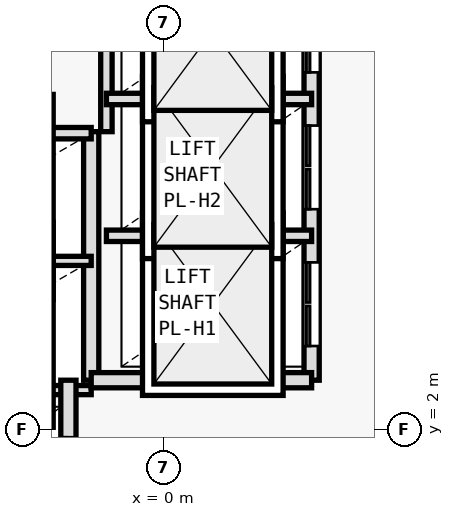
"""IFC4 building model, lengths in metres.
Left out: names, types, materials, properties, quantities, classifications, styles, units other than length and angle.
Written with IfcOpenShell. Run it as: python <this file> out.ifc"""

import sys

from ifc_helpers import new_model, si_unit, direction, frame, frame_2d, origin, place, context, subcontext, project, spatial, rectangle, extrude, element, fill, save


model = new_model("IFC4")
c1 = context("Model", 3, precision=1e-05, world=origin(), true_north=direction((0.0, 1.0)))
c2 = subcontext(c1, "Body", "Model", "MODEL_VIEW")
j1 = project(units=[si_unit("LENGTHUNIT", "METRE"), si_unit("PLANEANGLEUNIT", "RADIAN")], contexts=[c1])
p1 = place(None, origin())
s1 = spatial("IfcSite", under=j1, at=p1, CompositionType="ELEMENT")
p2 = place(p1, origin())
s2 = spatial("IfcBuilding", under=s1, at=p2, CompositionType="ELEMENT")
p3 = place(p2, frame((0.0, 0.0, 205.5)))
s3 = spatial("IfcBuildingStorey", under=s2, at=p3, CompositionType="ELEMENT", Elevation=205.5)
p4 = place(p3, frame((-0.95, 2.65, 0.0), z_axis=(0.0, 0.0, 1.0), x_axis=(0.0, 1.0, 0.0)))
e1 = element("IfcWall", 1, at=p4, inside=s3, PredefinedType="SOLIDWALL", context=c2, shape_type="SweptSolid", body=[
    extrude(rectangle(XDim=3.27, YDim=0.2, at=frame_2d((1.635, 0.0))), origin(), (0.0, 0.0, 1.0), 3.35),
])
for number, where, z_axis, x_axis in (
    (2, (-3.85, 2.52, 0.0), (0.0, 0.0, 1.0), (1.0, 0.0, 0.0)),
    (3, (-3.85, 4.22, 0.0), (0.0, 0.0, 1.0), (1.0, 0.0, 0.0)),
):
    element("IfcWall", number, at=place(p3, frame(where, z_axis=z_axis, x_axis=x_axis)), inside=s3, PredefinedType="PARTITIONING", context=c2, shape_type="SweptSolid", body=[
        extrude(rectangle(XDim=2.9, YDim=0.12, at=frame_2d((1.45, 0.0))), origin(), (0.0, 0.0, 1.0), 3.35),
    ])
p5 = place(p3, frame((-3.85, 5.9, 0.0), z_axis=(0.0, 0.0, 1.0), x_axis=(1.0, 0.0, 0.0)))
e4 = element("IfcWall", 4, at=p5, inside=s3, PredefinedType="PARTITIONING", context=c2, shape_type="SweptSolid", body=[
    extrude(rectangle(XDim=2.9, YDim=0.15, at=frame_2d((1.45, 0.0))), origin(), (0.0, 0.0, 1.0), 3.35),
])
p6 = place(p3, frame((-1.25, -6.05, 0.0), z_axis=(0.0, 0.0, 1.0), x_axis=(0.0, 1.0, 0.0)))
e5 = element("IfcWall", 5, at=p6, inside=s3, PredefinedType="SOLIDWALL", context=c2, shape_type="SweptSolid", body=[
    extrude(rectangle(XDim=8.7, YDim=0.2, at=frame_2d((4.35, 0.0))), origin(), (0.0, 0.0, 1.0), 3.35),
])
p7 = place(p6, frame((0.55, 0.0, 0.0)))
e6 = element("IfcOpeningElement", 6, at=p7, cuts=e5, PredefinedType="OPENING", context=c2, shape_type="SweptSolid", body=[
    extrude(rectangle(XDim=1.1, YDim=2.15, at=frame_2d((0.55, 1.075))), frame((0.0, 0.11, 0.0), z_axis=(0.0, -1.0, 0.0), x_axis=(1.0, 0.0, 0.0)), (0.0, 0.0, 1.0), 0.22),
])
p8 = place(p6, frame((2.65, 0.0, 0.0)))
e7 = element("IfcOpeningElement", 7, at=p8, cuts=e5, PredefinedType="OPENING", context=c2, shape_type="SweptSolid", body=[
    extrude(rectangle(XDim=1.1, YDim=2.15, at=frame_2d((0.55, 1.075))), frame((0.0, 0.11, 0.0), z_axis=(0.0, -1.0, 0.0), x_axis=(1.0, 0.0, 0.0)), (0.0, 0.0, 1.0), 0.22),
])
p9 = place(p6, frame((4.75, 0.0, 0.0)))
e8 = element("IfcOpeningElement", 8, at=p9, cuts=e5, PredefinedType="OPENING", context=c2, shape_type="SweptSolid", body=[
    extrude(rectangle(XDim=1.1, YDim=2.15, at=frame_2d((0.55, 1.075))), frame((0.0, 0.11, 0.0), z_axis=(0.0, -1.0, 0.0), x_axis=(1.0, 0.0, 0.0)), (0.0, 0.0, 1.0), 0.22),
])
p10 = place(p6, frame((6.85, 0.0, 0.0)))
e9 = element("IfcOpeningElement", 9, at=p10, cuts=e5, PredefinedType="OPENING", context=c2, shape_type="SweptSolid", body=[
    extrude(rectangle(XDim=1.1, YDim=2.15, at=frame_2d((0.55, 1.075))), frame((0.0, 0.11, 0.0), z_axis=(0.0, -1.0, 0.0), x_axis=(1.0, 0.0, 0.0)), (0.0, 0.0, 1.0), 0.22),
])
p11 = place(p3, frame((1.95, 2.65, 0.0), z_axis=(0.0, 0.0, 1.0), x_axis=(0.0, 1.0, 0.0)))
e10 = element("IfcWall", 10, at=p11, inside=s3, PredefinedType="SOLIDWALL", context=c2, shape_type="SweptSolid", body=[
    extrude(rectangle(XDim=7.295, YDim=0.2, at=frame_2d((3.647, 0.0))), origin(), (0.0, 0.0, 1.0), 3.35),
])
p12 = place(p11, frame((0.45, 0.0, 0.0)))
e11 = element("IfcOpeningElement", 11, at=p12, cuts=e10, PredefinedType="OPENING", context=c2, shape_type="SweptSolid", body=[
    extrude(rectangle(XDim=1.1, YDim=2.15, at=frame_2d((0.55, 1.075))), frame((0.0, 0.11, 0.0), z_axis=(0.0, -1.0, 0.0), x_axis=(1.0, 0.0, 0.0)), (0.0, 0.0, 1.0), 0.22),
])
p13 = place(p11, frame((2.25, 0.0, 0.0)))
e12 = element("IfcOpeningElement", 12, at=p13, cuts=e10, PredefinedType="OPENING", context=c2, shape_type="SweptSolid", body=[
    extrude(rectangle(XDim=1.1, YDim=2.15, at=frame_2d((0.55, 1.075))), frame((0.0, 0.11, 0.0), z_axis=(0.0, -1.0, 0.0), x_axis=(1.0, 0.0, 0.0)), (0.0, 0.0, 1.0), 0.22),
])
p14 = place(p11, frame((4.05, 0.0, 0.0)))
e13 = element("IfcOpeningElement", 13, at=p14, cuts=e10, PredefinedType="OPENING", context=c2, shape_type="SweptSolid", body=[
    extrude(rectangle(XDim=1.1, YDim=2.15, at=frame_2d((0.55, 1.075))), frame((0.0, 0.11, 0.0), z_axis=(0.0, -1.0, 0.0), x_axis=(1.0, 0.0, 0.0)), (0.0, 0.0, 1.0), 0.22),
])
p15 = place(p11, frame((5.85, 0.0, 0.0)))
e14 = element("IfcOpeningElement", 14, at=p15, cuts=e10, PredefinedType="OPENING", context=c2, shape_type="SweptSolid", body=[
    extrude(rectangle(XDim=1.1, YDim=2.15, at=frame_2d((0.55, 1.075))), frame((0.0, 0.11, 0.0), z_axis=(0.0, -1.0, 0.0), x_axis=(1.0, 0.0, 0.0)), (0.0, 0.0, 1.0), 0.22),
])
p16 = place(p3, frame((-0.95, 2.65, 0.0), z_axis=(0.0, 0.0, 1.0), x_axis=(1.0, 0.0, 0.0)))
e15 = element("IfcWall", 15, at=p16, inside=s3, PredefinedType="SOLIDWALL", context=c2, shape_type="SweptSolid", body=[
    extrude(rectangle(XDim=2.9, YDim=0.2, at=frame_2d((1.45, 0.0))), origin(), (0.0, 0.0, 1.0), 3.35),
])
p17 = place(p3, frame((-0.75, 5.92, 0.0), z_axis=(0.0, 0.0, 1.0), x_axis=(0.0, 1.0, 0.0)))
e16 = element("IfcWall", 16, at=p17, inside=s3, PredefinedType="PARTITIONING", context=c2, shape_type="SweptSolid", body=[
    extrude(rectangle(XDim=4.025, YDim=0.15, at=frame_2d((2.013, 0.0))), origin(), (0.0, 0.0, 1.0), 3.35),
])
for number, where, z_axis, x_axis in (
    (17, (-0.75, 4.55, 0.0), (0.0, 0.0, 1.0), (1.0, 0.0, 0.0)),
    (18, (-0.75, 6.35, 0.0), (0.0, 0.0, 1.0), (1.0, 0.0, 0.0)),
):
    element("IfcWall", number, at=place(p3, frame(where, z_axis=z_axis, x_axis=x_axis)), inside=s3, PredefinedType="PARTITIONING", context=c2, shape_type="SweptSolid", body=[
        extrude(rectangle(XDim=2.7, YDim=0.15, at=frame_2d((1.35, 0.0))), origin(), (0.0, 0.0, 1.0), 3.35),
    ])
p18 = place(p12, origin())
e19 = element("IfcDoor", 19, at=p18, inside=s3, OperationType="DOUBLE_DOOR_SLIDING", PredefinedType="DOOR", context=c2, shape_type="SweptSolid", body=[
    extrude(rectangle(XDim=1.1, YDim=2.15, at=frame_2d((0.55, 1.075))), frame((0.0, 0.025, 0.0), z_axis=(0.0, -1.0, 0.0), x_axis=(1.0, 0.0, 0.0)), (0.0, 0.0, 1.0), 0.05),
])
fill(e11, e19)
p19 = place(p13, origin())
e20 = element("IfcDoor", 20, at=p19, inside=s3, OperationType="DOUBLE_DOOR_SLIDING", PredefinedType="DOOR", context=c2, shape_type="SweptSolid", body=[
    extrude(rectangle(XDim=1.1, YDim=2.15, at=frame_2d((0.55, 1.075))), frame((0.0, 0.025, 0.0), z_axis=(0.0, -1.0, 0.0), x_axis=(1.0, 0.0, 0.0)), (0.0, 0.0, 1.0), 0.05),
])
fill(e12, e20)
p20 = place(p14, origin())
e21 = element("IfcDoor", 21, at=p20, inside=s3, OperationType="DOUBLE_DOOR_SLIDING", PredefinedType="DOOR", context=c2, shape_type="SweptSolid", body=[
    extrude(rectangle(XDim=1.1, YDim=2.15, at=frame_2d((0.55, 1.075))), frame((0.0, 0.025, 0.0), z_axis=(0.0, -1.0, 0.0), x_axis=(1.0, 0.0, 0.0)), (0.0, 0.0, 1.0), 0.05),
])
fill(e13, e21)
save(model, sys.argv[1])
